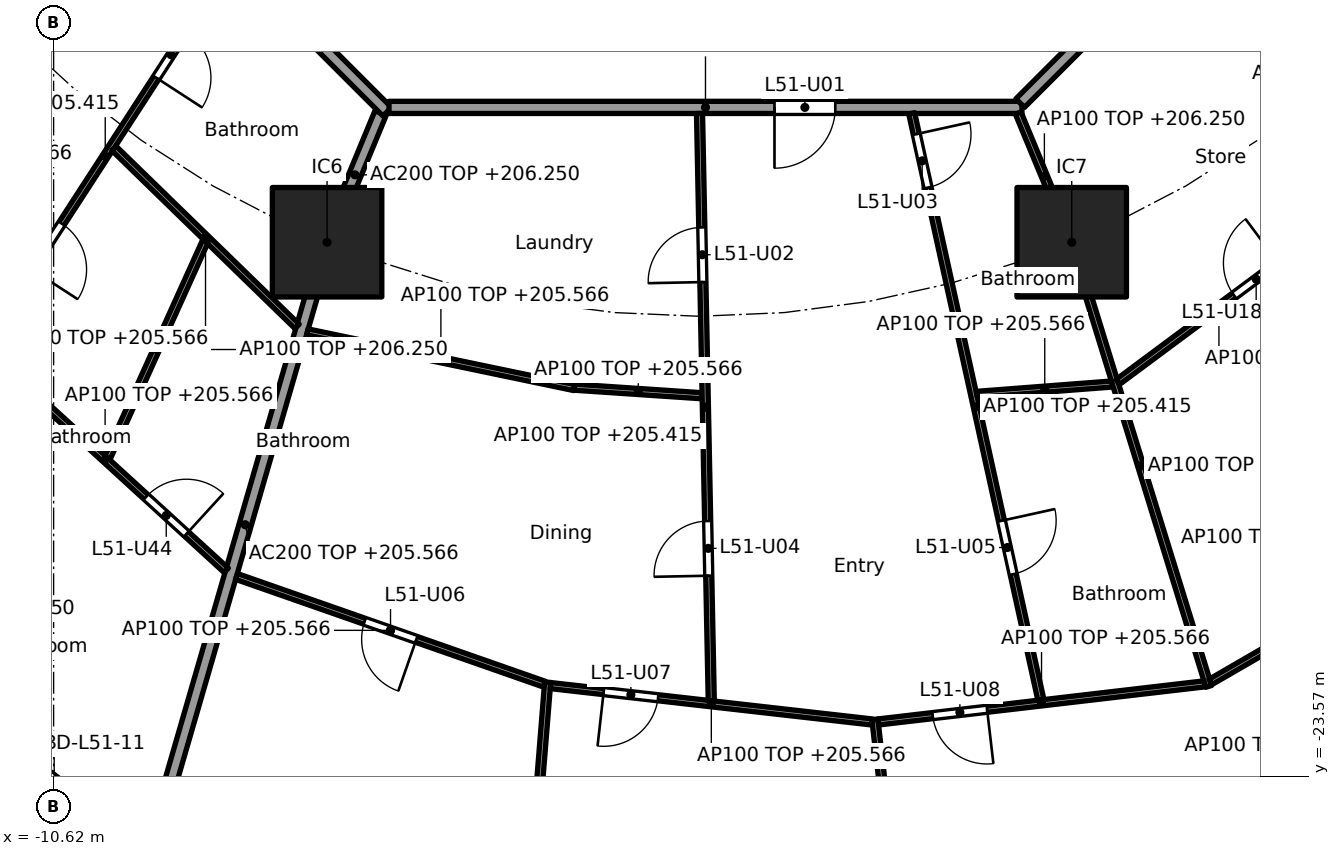
"""IFC4 building model, lengths in metres.
Left out: names, types, materials, properties, quantities, classifications, styles, units other than length and angle.
Written with IfcOpenShell. Run it as: python <this file> out.ifc"""

import sys

from ifc_helpers import new_model, si_unit, direction, frame, frame_2d, origin, origin_2d, place, context, subcontext, project, spatial, rectangle, extrude, element, fill, save


model = new_model("IFC4")
c1 = context("Model", 3, precision=1e-05, world=origin(), true_north=direction((0.0, 1.0)))
c2 = subcontext(c1, "Body", "Model", "MODEL_VIEW")
j1 = project(units=[si_unit("LENGTHUNIT", "METRE"), si_unit("PLANEANGLEUNIT", "RADIAN")], contexts=[c1])
p1 = place(None, origin())
s1 = spatial("IfcSite", under=j1, at=p1, CompositionType="ELEMENT")
p2 = place(p1, origin())
s2 = spatial("IfcBuilding", under=s1, at=p2, CompositionType="ELEMENT")
p3 = place(p2, frame((0.0, 0.0, 202.9)))
s3 = spatial("IfcBuildingStorey", under=s2, at=p3, CompositionType="ELEMENT", Elevation=202.9)
for number, where, z_axis, x_axis in (
    (1, (-6.123, -14.782, 0.0), (0.0, 0.0, 1.0), (1.0, 0.0, 0.0)),
    (2, (6.123, -14.782, 0.0), (0.0, 0.0, 1.0), (1.0, 0.0, 0.0)),
):
    element("IfcColumn", number, at=place(p3, frame(where, z_axis=z_axis, x_axis=x_axis)), inside=s3, PredefinedType="COLUMN", context=c2, shape_type="SweptSolid", body=[
        extrude(rectangle(XDim=1.8, YDim=1.8, at=origin_2d()), origin(), (0.0, 0.0, 1.0), 3.7),
    ])
p4 = place(p3, frame((-9.45, -24.574, 0.0), z_axis=(0.0, 0.0, 1.0), x_axis=(-0.796055733703, 0.60522332146, 0.0)))
e3 = element("IfcWall", 3, at=p4, inside=s3, PredefinedType="SOLIDWALL", context=c2, shape_type="SweptSolid", body=[
    extrude(rectangle(XDim=2.917, YDim=0.25, at=frame_2d((1.458, 0.0))), origin(), (0.0, 0.0, 1.0), 3.35),
])
p5 = place(p4, frame((0.408, 0.0, 0.0)))
e4 = element("IfcOpeningElement", 4, at=p5, cuts=e3, PredefinedType="OPENING", context=c2, shape_type="SweptSolid", body=[
    extrude(rectangle(XDim=2.1, YDim=2.4, at=frame_2d((1.05, 1.2))), frame((0.0, 0.135, 0.0), z_axis=(0.0, -1.0, 0.0), x_axis=(1.0, 0.0, 0.0)), (0.0, 0.0, 1.0), 0.27),
])
p6 = place(p3, frame((-5.243, -12.657, 0.0), z_axis=(0.0, 0.0, 1.0), x_axis=(-0.382707856524, -0.923869415315, 0.0)))
e5 = element("IfcWall", 5, at=p6, inside=s3, PredefinedType="PARTITIONING", context=c2, shape_type="SweptSolid", body=[
    extrude(rectangle(XDim=2.2, YDim=0.2, at=frame_2d((1.1, 0.0))), origin(), (0.0, 0.0, 1.0), 3.35),
])
p7 = place(p3, frame((-6.137, -14.83, 0.0), z_axis=(0.0, 0.0, 1.0), x_axis=(-0.278461169897, -0.96044748782, 0.0)))
e6 = element("IfcWall", 6, at=p7, inside=s3, PredefinedType="PARTITIONING", context=c2, shape_type="SweptSolid", body=[
    extrude(rectangle(XDim=9.573, YDim=0.2, at=frame_2d((4.787, 0.0))), origin(), (0.0, 0.0, 1.0), 2.666),
])
p8 = place(p3, frame((-12.635, -5.134, 0.0), z_axis=(0.0, 0.0, 1.0), x_axis=(0.707106781187, -0.707106781187, 0.0)))
e7 = element("IfcWall", 7, at=p8, inside=s3, PredefinedType="PARTITIONING", context=c2, shape_type="SweptSolid", body=[
    extrude(rectangle(XDim=10.609, YDim=0.2, at=frame_2d((5.305, 0.0))), origin(), (0.0, 0.0, 1.0), 3.35),
])
p9 = place(p8, frame((4.804, 0.0, 0.0)))
e8 = element("IfcOpeningElement", 8, at=p9, cuts=e7, PredefinedType="OPENING", context=c2, shape_type="SweptSolid", body=[
    extrude(rectangle(XDim=1.0, YDim=2.1, at=frame_2d((0.5, 1.05))), frame((0.0, 0.11, 0.0), z_axis=(0.0, -1.0, 0.0), x_axis=(1.0, 0.0, 0.0)), (0.0, 0.0, 1.0), 0.22),
])
p10 = place(p3, frame((-5.104, -12.565, 0.0), z_axis=(0.0, 0.0, 1.0), x_axis=(1.0, 0.0, 0.0)))
e9 = element("IfcWall", 9, at=p10, inside=s3, PredefinedType="PARTITIONING", context=c2, shape_type="SweptSolid", body=[
    extrude(rectangle(XDim=10.409, YDim=0.2, at=frame_2d((5.205, 0.0))), origin(), (0.0, 0.0, 1.0), 3.35),
])
p11 = place(p10, frame((6.339, 0.0, 0.0)))
e10 = element("IfcOpeningElement", 10, at=p11, cuts=e9, PredefinedType="OPENING", context=c2, shape_type="SweptSolid", body=[
    extrude(rectangle(XDim=1.0, YDim=2.1, at=frame_2d((0.5, 1.05))), frame((0.0, 0.11, 0.0), z_axis=(0.0, -1.0, 0.0), x_axis=(1.0, 0.0, 0.0)), (0.0, 0.0, 1.0), 0.22),
])
p12 = place(p3, frame((5.275, -12.494, 0.0), z_axis=(0.0, 0.0, 1.0), x_axis=(0.707106781187, 0.707106781187, 0.0)))
e11 = element("IfcWall", 11, at=p12, inside=s3, PredefinedType="PARTITIONING", context=c2, shape_type="SweptSolid", body=[
    extrude(rectangle(XDim=10.409, YDim=0.2, at=frame_2d((5.205, 0.0))), origin(), (0.0, 0.0, 1.0), 3.35),
])
p13 = place(p3, frame((-10.189, -7.721, 0.0), z_axis=(0.0, 0.0, 1.0), x_axis=(-0.773121441079, -0.634258021112, 0.0)))
e12 = element("IfcWall", 12, at=p13, inside=s3, PredefinedType="PARTITIONING", context=c2, shape_type="SweptSolid", body=[
    extrude(rectangle(XDim=6.577, YDim=0.1, at=frame_2d((3.289, 0.0))), origin(), (0.0, 0.0, 1.0), 2.515),
])
p14 = place(p13, frame((1.104, 0.0, 0.0)))
e13 = element("IfcOpeningElement", 13, at=p14, cuts=e12, PredefinedType="OPENING", context=c2, shape_type="SweptSolid", body=[
    extrude(rectangle(XDim=0.9, YDim=2.1, at=frame_2d((0.45, 1.05))), frame((0.0, 0.06, 0.0), z_axis=(0.0, -1.0, 0.0), x_axis=(1.0, 0.0, 0.0)), (0.0, 0.0, 1.0), 0.12),
])
p15 = place(p13, frame((4.367, 0.0, 0.0)))
e14 = element("IfcOpeningElement", 14, at=p15, cuts=e12, PredefinedType="OPENING", context=c2, shape_type="SweptSolid", body=[
    extrude(rectangle(XDim=0.9, YDim=2.1, at=frame_2d((0.45, 1.05))), frame((0.0, 0.06, 0.0), z_axis=(0.0, -1.0, 0.0), x_axis=(1.0, 0.0, 0.0)), (0.0, 0.0, 1.0), 0.12),
])
p16 = place(p3, frame((-7.712, -10.195, 0.0), z_axis=(0.0, 0.0, 1.0), x_axis=(-0.544179442551, -0.838968851809, 0.0)))
e15 = element("IfcWall", 15, at=p16, inside=s3, PredefinedType="PARTITIONING", context=c2, shape_type="SweptSolid", body=[
    extrude(rectangle(XDim=7.566, YDim=0.1, at=frame_2d((3.783, 0.0))), origin(), (0.0, 0.0, 1.0), 2.515),
])
p17 = place(p16, frame((1.343, 0.0, 0.0)))
e16 = element("IfcOpeningElement", 16, at=p17, cuts=e15, PredefinedType="OPENING", context=c2, shape_type="SweptSolid", body=[
    extrude(rectangle(XDim=0.9, YDim=2.1, at=frame_2d((0.45, 1.05))), frame((0.0, 0.06, 0.0), z_axis=(0.0, -1.0, 0.0), x_axis=(1.0, 0.0, 0.0)), (0.0, 0.0, 1.0), 0.12),
])
p18 = place(p16, frame((5.101, 0.0, 0.0)))
e17 = element("IfcOpeningElement", 17, at=p18, cuts=e15, PredefinedType="OPENING", context=c2, shape_type="SweptSolid", body=[
    extrude(rectangle(XDim=0.9, YDim=2.1, at=frame_2d((0.45, 1.05))), frame((0.0, 0.06, 0.0), z_axis=(0.0, -1.0, 0.0), x_axis=(1.0, 0.0, 0.0)), (0.0, 0.0, 1.0), 0.12),
])
p19 = place(p3, frame((-9.627, -13.238, 0.0), z_axis=(0.0, 0.0, 1.0), x_axis=(0.716919058692, -0.697156412352, 0.0)))
e18 = element("IfcWall", 18, at=p19, inside=s3, PredefinedType="PARTITIONING", context=c2, shape_type="SweptSolid", body=[
    extrude(rectangle(XDim=4.2, YDim=0.1, at=frame_2d((2.1, 0.0))), origin(), (0.0, 0.0, 1.0), 2.666),
])
p20 = place(p3, frame((-11.766, -16.535, 0.0), z_axis=(0.0, 0.0, 1.0), x_axis=(0.73807320557, -0.674720640872, 0.0)))
e19 = element("IfcWall", 19, at=p20, inside=s3, PredefinedType="PARTITIONING", context=c2, shape_type="SweptSolid", body=[
    extrude(rectangle(XDim=5.399, YDim=0.1, at=frame_2d((2.699, 0.0))), origin(), (0.0, 0.0, 1.0), 2.666),
])
p21 = place(p20, frame((3.612, 0.0, 0.0)))
e20 = element("IfcOpeningElement", 20, at=p21, cuts=e19, PredefinedType="OPENING", context=c2, shape_type="SweptSolid", body=[
    extrude(rectangle(XDim=0.9, YDim=2.1, at=frame_2d((0.45, 1.05))), frame((0.0, 0.06, 0.0), z_axis=(0.0, -1.0, 0.0), x_axis=(1.0, 0.0, 0.0)), (0.0, 0.0, 1.0), 0.12),
])
p22 = place(p3, frame((-8.125, -14.765, 0.0), z_axis=(0.0, 0.0, 1.0), x_axis=(-0.411745679848, -0.911298795745, 0.0)))
e21 = element("IfcWall", 21, at=p22, inside=s3, PredefinedType="PARTITIONING", context=c2, shape_type="SweptSolid", body=[
    extrude(rectangle(XDim=3.909, YDim=0.1, at=frame_2d((1.955, 0.0))), origin(), (0.0, 0.0, 1.0), 3.35),
])
p23 = place(p3, frame((-6.447, -16.256, 0.0), z_axis=(0.0, 0.0, 1.0), x_axis=(0.978902917122, -0.20432591331, 0.0)))
e22 = element("IfcWall", 22, at=p23, inside=s3, PredefinedType="PARTITIONING", context=c2, shape_type="SweptSolid", body=[
    extrude(rectangle(XDim=4.486, YDim=0.1, at=frame_2d((2.243, 0.0))), origin(), (0.0, 0.0, 1.0), 2.666),
])
p24 = place(p3, frame((-7.613, -20.278, 0.0), z_axis=(0.0, 0.0, 1.0), x_axis=(0.94391294884, -0.330194404878, 0.0)))
e23 = element("IfcWall", 23, at=p24, inside=s3, PredefinedType="PARTITIONING", context=c2, shape_type="SweptSolid", body=[
    extrude(rectangle(XDim=5.367, YDim=0.1, at=frame_2d((2.684, 0.0))), origin(), (0.0, 0.0, 1.0), 2.666),
])
p25 = place(p24, frame((2.234, 0.0, 0.0)))
e24 = element("IfcOpeningElement", 24, at=p25, cuts=e23, PredefinedType="OPENING", context=c2, shape_type="SweptSolid", body=[
    extrude(rectangle(XDim=0.9, YDim=2.1, at=frame_2d((0.45, 1.05))), frame((0.0, 0.06, 0.0), z_axis=(0.0, -1.0, 0.0), x_axis=(1.0, 0.0, 0.0)), (0.0, 0.0, 1.0), 0.12),
])
p26 = place(p3, frame((-2.055, -17.166, 0.0), z_axis=(0.0, 0.0, 1.0), x_axis=(0.997756833447, -0.06694252243, 0.0)))
e25 = element("IfcWall", 25, at=p26, inside=s3, PredefinedType="PARTITIONING", context=c2, shape_type="SweptSolid", body=[
    extrude(rectangle(XDim=2.104, YDim=0.1, at=frame_2d((1.052, 0.0))), origin(), (0.0, 0.0, 1.0), 2.666),
])
p27 = place(p3, frame((-2.495, -22.017, 0.0), z_axis=(0.0, 0.0, 1.0), x_axis=(-0.080150660566, -0.99678276049, 0.0)))
e26 = element("IfcWall", 26, at=p27, inside=s3, PredefinedType="PARTITIONING", context=c2, shape_type="SweptSolid", body=[
    extrude(rectangle(XDim=4.858, YDim=0.1, at=frame_2d((2.429, 0.0))), origin(), (0.0, 0.0, 1.0), 2.666),
])
p28 = place(p3, frame((-2.449, -22.073, 0.0), z_axis=(0.0, 0.0, 1.0), x_axis=(0.993660315081, -0.112424099879, 0.0)))
e27 = element("IfcWall", 27, at=p28, inside=s3, PredefinedType="PARTITIONING", context=c2, shape_type="SweptSolid", body=[
    extrude(rectangle(XDim=5.325, YDim=0.1, at=frame_2d((2.662, 0.0))), origin(), (0.0, 0.0, 1.0), 2.666),
])
p29 = place(p28, frame((0.881, 0.0, 0.0)))
e28 = element("IfcOpeningElement", 28, at=p29, cuts=e27, PredefinedType="OPENING", context=c2, shape_type="SweptSolid", body=[
    extrude(rectangle(XDim=0.9, YDim=2.1, at=frame_2d((0.45, 1.05))), frame((0.0, 0.06, 0.0), z_axis=(0.0, -1.0, 0.0), x_axis=(1.0, 0.0, 0.0)), (0.0, 0.0, 1.0), 0.12),
])
p30 = place(p3, frame((0.002, -12.665, 0.0), z_axis=(0.0, 0.0, 1.0), x_axis=(0.019992969345, -0.999800120613, 0.0)))
e29 = element("IfcWall", 29, at=p30, inside=s3, PredefinedType="PARTITIONING", context=c2, shape_type="SweptSolid", body=[
    extrude(rectangle(XDim=9.659, YDim=0.1, at=frame_2d((4.83, 0.0))), origin(), (0.0, 0.0, 1.0), 2.515),
])
p31 = place(p30, frame((1.873, 0.0, 0.0)))
e30 = element("IfcOpeningElement", 30, at=p31, cuts=e29, PredefinedType="OPENING", context=c2, shape_type="SweptSolid", body=[
    extrude(rectangle(XDim=0.9, YDim=2.1, at=frame_2d((0.45, 1.05))), frame((0.0, 0.06, 0.0), z_axis=(0.0, -1.0, 0.0), x_axis=(1.0, 0.0, 0.0)), (0.0, 0.0, 1.0), 0.12),
])
p32 = place(p30, frame((6.703, 0.0, 0.0)))
e31 = element("IfcOpeningElement", 31, at=p32, cuts=e29, PredefinedType="OPENING", context=c2, shape_type="SweptSolid", body=[
    extrude(rectangle(XDim=0.9, YDim=2.1, at=frame_2d((0.45, 1.05))), frame((0.0, 0.06, 0.0), z_axis=(0.0, -1.0, 0.0), x_axis=(1.0, 0.0, 0.0)), (0.0, 0.0, 1.0), 0.12),
])
p33 = place(p3, frame((2.885, -22.627, 0.0), z_axis=(0.0, 0.0, 1.0), x_axis=(0.113634556485, -0.993522615531, 0.0)))
e32 = element("IfcWall", 32, at=p33, inside=s3, PredefinedType="PARTITIONING", context=c2, shape_type="SweptSolid", body=[
    extrude(rectangle(XDim=5.244, YDim=0.1, at=frame_2d((2.622, 0.0))), origin(), (0.0, 0.0, 1.0), 2.666),
])
p34 = place(p3, frame((2.941, -22.671, 0.0), z_axis=(0.0, 0.0, 1.0), x_axis=(0.993245806382, 0.1160291692, 0.0)))
e33 = element("IfcWall", 33, at=p34, inside=s3, PredefinedType="PARTITIONING", context=c2, shape_type="SweptSolid", body=[
    extrude(rectangle(XDim=5.408, YDim=0.1, at=frame_2d((2.704, 0.0))), origin(), (0.0, 0.0, 1.0), 2.666),
])
p35 = place(p34, frame((0.902, 0.0, 0.0)))
e34 = element("IfcOpeningElement", 34, at=p35, cuts=e33, PredefinedType="OPENING", context=c2, shape_type="SweptSolid", body=[
    extrude(rectangle(XDim=0.9, YDim=2.1, at=frame_2d((0.45, 1.05))), frame((0.0, 0.06, 0.0), z_axis=(0.0, -1.0, 0.0), x_axis=(1.0, 0.0, 0.0)), (0.0, 0.0, 1.0), 0.12),
])
p36 = place(p3, frame((3.491, -12.662, 0.0), z_axis=(0.0, 0.0, 1.0), x_axis=(0.215082442833, -0.976595895335, 0.0)))
e35 = element("IfcWall", 35, at=p36, inside=s3, PredefinedType="PARTITIONING", context=c2, shape_type="SweptSolid", body=[
    extrude(rectangle(XDim=9.878, YDim=0.1, at=frame_2d((4.939, 0.0))), origin(), (0.0, 0.0, 1.0), 2.515),
])
p37 = place(p36, frame((0.35, 0.0, 0.0)))
e36 = element("IfcOpeningElement", 36, at=p37, cuts=e35, PredefinedType="OPENING", context=c2, shape_type="SweptSolid", body=[
    extrude(rectangle(XDim=0.9, YDim=2.1, at=frame_2d((0.45, 1.05))), frame((0.0, 0.06, 0.0), z_axis=(0.0, -1.0, 0.0), x_axis=(1.0, 0.0, 0.0)), (0.0, 0.0, 1.0), 0.12),
])
p38 = place(p36, frame((6.861, 0.0, 0.0)))
e37 = element("IfcOpeningElement", 37, at=p38, cuts=e35, PredefinedType="OPENING", context=c2, shape_type="SweptSolid", body=[
    extrude(rectangle(XDim=0.9, YDim=2.1, at=frame_2d((0.45, 1.05))), frame((0.0, 0.06, 0.0), z_axis=(0.0, -1.0, 0.0), x_axis=(1.0, 0.0, 0.0)), (0.0, 0.0, 1.0), 0.12),
])
p39 = place(p3, frame((4.568, -17.284, 0.0), z_axis=(0.0, 0.0, 1.0), x_axis=(0.997076339393, 0.076411867029, 0.0)))
e38 = element("IfcWall", 38, at=p39, inside=s3, PredefinedType="PARTITIONING", context=c2, shape_type="SweptSolid", body=[
    extrude(rectangle(XDim=2.23, YDim=0.1, at=frame_2d((1.115, 0.0))), origin(), (0.0, 0.0, 1.0), 2.666),
])
p40 = place(p3, frame((5.243, -12.657, 0.0), z_axis=(0.0, 0.0, 1.0), x_axis=(0.382719158442, -0.923864733477, 0.0)))
e39 = element("IfcWall", 39, at=p40, inside=s3, PredefinedType="PARTITIONING", context=c2, shape_type="SweptSolid", body=[
    extrude(rectangle(XDim=2.25, YDim=0.1, at=frame_2d((1.125, 0.0))), origin(), (0.0, 0.0, 1.0), 3.35),
])
p41 = place(p3, frame((6.138, -14.83, 0.0), z_axis=(0.0, 0.0, 1.0), x_axis=(0.294822274121, -0.955552105687, 0.0)))
e40 = element("IfcWall", 40, at=p41, inside=s3, PredefinedType="PARTITIONING", context=c2, shape_type="SweptSolid", body=[
    extrude(rectangle(XDim=7.594, YDim=0.1, at=frame_2d((3.797, 0.0))), origin(), (0.0, 0.0, 1.0), 3.35),
])
p42 = place(p3, frame((6.881, -17.08, 0.0), z_axis=(0.0, 0.0, 1.0), x_axis=(0.802784956441, 0.596268659005, 0.0)))
e41 = element("IfcWall", 41, at=p42, inside=s3, PredefinedType="PARTITIONING", context=c2, shape_type="SweptSolid", body=[
    extrude(rectangle(XDim=4.142, YDim=0.1, at=frame_2d((2.071, 0.0))), origin(), (0.0, 0.0, 1.0), 2.666),
])
p43 = place(p42, frame((2.384, 0.0, 0.0)))
e42 = element("IfcOpeningElement", 42, at=p43, cuts=e41, PredefinedType="OPENING", context=c2, shape_type="SweptSolid", body=[
    extrude(rectangle(XDim=0.9, YDim=2.1, at=frame_2d((0.45, 1.05))), frame((0.0, 0.06, 0.0), z_axis=(0.0, -1.0, 0.0), x_axis=(1.0, 0.0, 0.0)), (0.0, 0.0, 1.0), 0.12),
])
p44 = place(p3, frame((8.405, -22.013, 0.0), z_axis=(0.0, 0.0, 1.0), x_axis=(0.865277177388, 0.501293732547, 0.0)))
e43 = element("IfcWall", 43, at=p44, inside=s3, PredefinedType="PARTITIONING", context=c2, shape_type="SweptSolid", body=[
    extrude(rectangle(XDim=5.27, YDim=0.1, at=frame_2d((2.635, 0.0))), origin(), (0.0, 0.0, 1.0), 2.666),
])
p45 = place(p3, frame((8.943, -8.966, 0.0), z_axis=(0.0, 0.0, 1.0), x_axis=(0.587181355751, -0.809455406714, 0.0)))
e44 = element("IfcWall", 44, at=p45, inside=s3, PredefinedType="PARTITIONING", context=c2, shape_type="SweptSolid", body=[
    extrude(rectangle(XDim=10.441, YDim=0.1, at=frame_2d((5.221, 0.0))), origin(), (0.0, 0.0, 1.0), 2.515),
])
p46 = place(p5, origin())
e45 = element("IfcDoor", 45, at=p46, inside=s3, OperationType="SLIDING_TO_LEFT", PredefinedType="DOOR", context=c2, shape_type="SweptSolid", body=[
    extrude(rectangle(XDim=2.1, YDim=2.4, at=frame_2d((1.05, 1.2))), frame((0.0, 0.025, 0.0), z_axis=(0.0, -1.0, 0.0), x_axis=(1.0, 0.0, 0.0)), (0.0, 0.0, 1.0), 0.05),
])
fill(e4, e45)
p47 = place(p11, frame((1.0, 0.0, 0.0), x_axis=(-1.0, 0.0, 0.0)))
e46 = element("IfcDoor", 46, at=p47, inside=s3, OperationType="SINGLE_SWING_RIGHT", PredefinedType="DOOR", context=c2, shape_type="SweptSolid", body=[
    extrude(rectangle(XDim=1.0, YDim=2.1, at=frame_2d((0.5, 1.05))), frame((0.0, 0.025, 0.0), z_axis=(0.0, -1.0, 0.0), x_axis=(1.0, 0.0, 0.0)), (0.0, 0.0, 1.0), 0.05),
])
fill(e10, e46)
p48 = place(p31, frame((0.9, 0.0, 0.0), x_axis=(-1.0, 0.0, 0.0)))
e47 = element("IfcDoor", 47, at=p48, inside=s3, OperationType="SINGLE_SWING_LEFT", PredefinedType="DOOR", context=c2, shape_type="SweptSolid", body=[
    extrude(rectangle(XDim=0.9, YDim=2.1, at=frame_2d((0.45, 1.05))), frame((0.0, 0.025, 0.0), z_axis=(0.0, -1.0, 0.0), x_axis=(1.0, 0.0, 0.0)), (0.0, 0.0, 1.0), 0.05),
])
fill(e30, e47)
p49 = place(p37, origin())
e48 = element("IfcDoor", 48, at=p49, inside=s3, OperationType="SINGLE_SWING_LEFT", PredefinedType="DOOR", context=c2, shape_type="SweptSolid", body=[
    extrude(rectangle(XDim=0.9, YDim=2.1, at=frame_2d((0.45, 1.05))), frame((0.0, 0.025, 0.0), z_axis=(0.0, -1.0, 0.0), x_axis=(1.0, 0.0, 0.0)), (0.0, 0.0, 1.0), 0.05),
])
fill(e36, e48)
p50 = place(p32, frame((0.9, 0.0, 0.0), x_axis=(-1.0, 0.0, 0.0)))
e49 = element("IfcDoor", 49, at=p50, inside=s3, OperationType="SINGLE_SWING_LEFT", PredefinedType="DOOR", context=c2, shape_type="SweptSolid", body=[
    extrude(rectangle(XDim=0.9, YDim=2.1, at=frame_2d((0.45, 1.05))), frame((0.0, 0.025, 0.0), z_axis=(0.0, -1.0, 0.0), x_axis=(1.0, 0.0, 0.0)), (0.0, 0.0, 1.0), 0.05),
])
fill(e31, e49)
p51 = place(p38, origin())
e50 = element("IfcDoor", 50, at=p51, inside=s3, OperationType="SINGLE_SWING_LEFT", PredefinedType="DOOR", context=c2, shape_type="SweptSolid", body=[
    extrude(rectangle(XDim=0.9, YDim=2.1, at=frame_2d((0.45, 1.05))), frame((0.0, 0.025, 0.0), z_axis=(0.0, -1.0, 0.0), x_axis=(1.0, 0.0, 0.0)), (0.0, 0.0, 1.0), 0.05),
])
fill(e37, e50)
p52 = place(p25, frame((0.9, 0.0, 0.0), x_axis=(-1.0, 0.0, 0.0)))
e51 = element("IfcDoor", 51, at=p52, inside=s3, OperationType="SINGLE_SWING_LEFT", PredefinedType="DOOR", context=c2, shape_type="SweptSolid", body=[
    extrude(rectangle(XDim=0.9, YDim=2.1, at=frame_2d((0.45, 1.05))), frame((0.0, 0.025, 0.0), z_axis=(0.0, -1.0, 0.0), x_axis=(1.0, 0.0, 0.0)), (0.0, 0.0, 1.0), 0.05),
])
fill(e24, e51)
p53 = place(p29, frame((0.9, 0.0, 0.0), x_axis=(-1.0, 0.0, 0.0)))
e52 = element("IfcDoor", 52, at=p53, inside=s3, OperationType="SINGLE_SWING_RIGHT", PredefinedType="DOOR", context=c2, shape_type="SweptSolid", body=[
    extrude(rectangle(XDim=0.9, YDim=2.1, at=frame_2d((0.45, 1.05))), frame((0.0, 0.025, 0.0), z_axis=(0.0, -1.0, 0.0), x_axis=(1.0, 0.0, 0.0)), (0.0, 0.0, 1.0), 0.05),
])
fill(e28, e52)
p54 = place(p35, frame((0.9, 0.0, 0.0), x_axis=(-1.0, 0.0, 0.0)))
e53 = element("IfcDoor", 53, at=p54, inside=s3, OperationType="SINGLE_SWING_LEFT", PredefinedType="DOOR", context=c2, shape_type="SweptSolid", body=[
    extrude(rectangle(XDim=0.9, YDim=2.1, at=frame_2d((0.45, 1.05))), frame((0.0, 0.025, 0.0), z_axis=(0.0, -1.0, 0.0), x_axis=(1.0, 0.0, 0.0)), (0.0, 0.0, 1.0), 0.05),
])
fill(e34, e53)
p55 = place(p43, origin())
e54 = element("IfcDoor", 54, at=p55, inside=s3, OperationType="SINGLE_SWING_RIGHT", PredefinedType="DOOR", context=c2, shape_type="SweptSolid", body=[
    extrude(rectangle(XDim=0.9, YDim=2.1, at=frame_2d((0.45, 1.05))), frame((0.0, 0.025, 0.0), z_axis=(0.0, -1.0, 0.0), x_axis=(1.0, 0.0, 0.0)), (0.0, 0.0, 1.0), 0.05),
])
fill(e42, e54)
p56 = place(p17, origin())
e55 = element("IfcDoor", 55, at=p56, inside=s3, OperationType="SINGLE_SWING_RIGHT", PredefinedType="DOOR", context=c2, shape_type="SweptSolid", body=[
    extrude(rectangle(XDim=0.9, YDim=2.1, at=frame_2d((0.45, 1.05))), frame((0.0, 0.025, 0.0), z_axis=(0.0, -1.0, 0.0), x_axis=(1.0, 0.0, 0.0)), (0.0, 0.0, 1.0), 0.05),
])
fill(e16, e55)
p57 = place(p18, origin())
e56 = element("IfcDoor", 56, at=p57, inside=s3, OperationType="SINGLE_SWING_RIGHT", PredefinedType="DOOR", context=c2, shape_type="SweptSolid", body=[
    extrude(rectangle(XDim=0.9, YDim=2.1, at=frame_2d((0.45, 1.05))), frame((0.0, 0.025, 0.0), z_axis=(0.0, -1.0, 0.0), x_axis=(1.0, 0.0, 0.0)), (0.0, 0.0, 1.0), 0.05),
])
fill(e17, e56)
p58 = place(p21, origin())
e57 = element("IfcDoor", 57, at=p58, inside=s3, OperationType="SINGLE_SWING_RIGHT", PredefinedType="DOOR", context=c2, shape_type="SweptSolid", body=[
    extrude(rectangle(XDim=0.9, YDim=2.1, at=frame_2d((0.45, 1.05))), frame((0.0, 0.025, 0.0), z_axis=(0.0, -1.0, 0.0), x_axis=(1.0, 0.0, 0.0)), (0.0, 0.0, 1.0), 0.05),
])
fill(e20, e57)
save(model, sys.argv[1])
